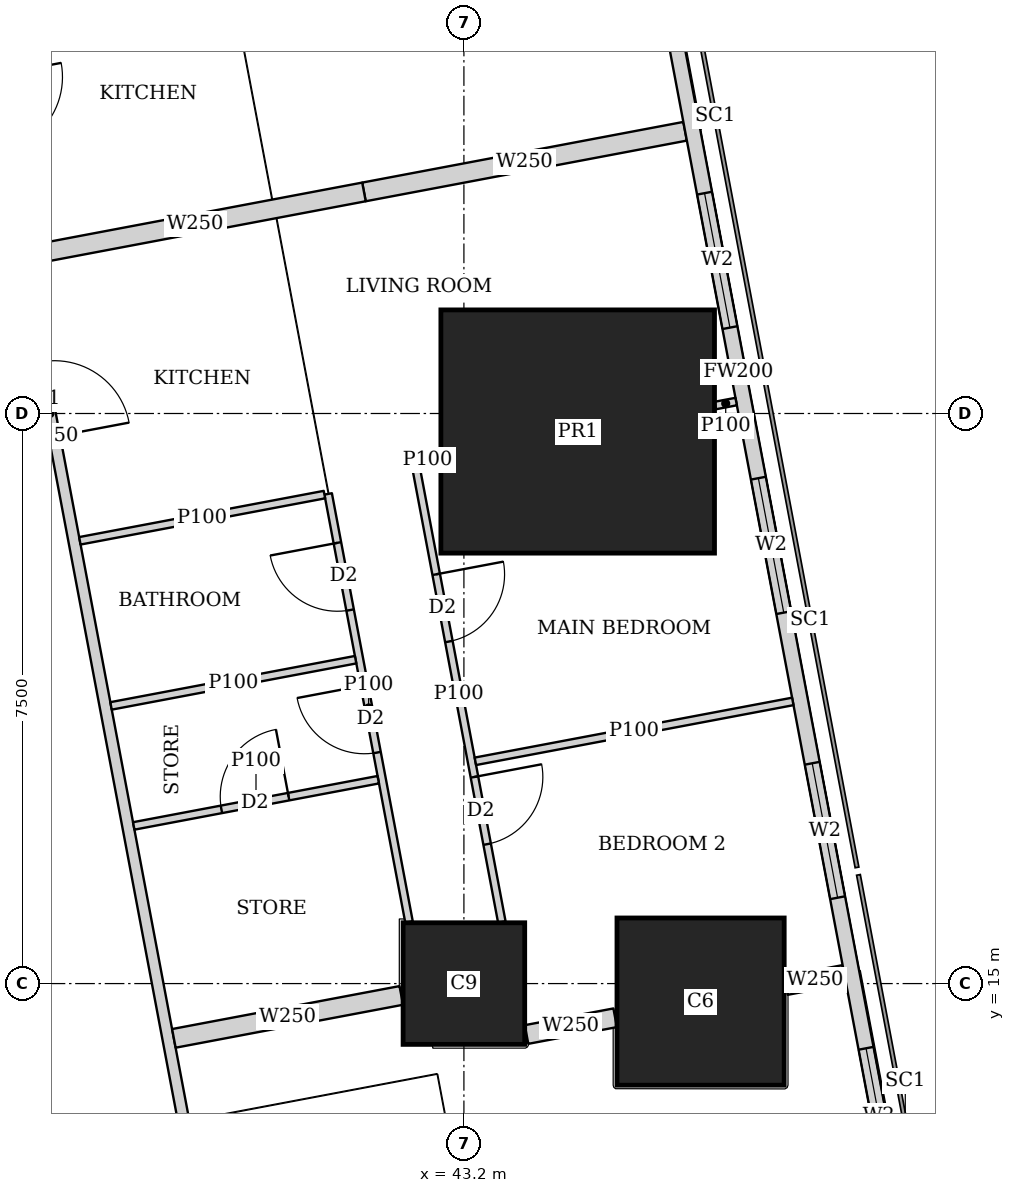
"""IFC4 building model, lengths in metres.
Left out: names, types, materials, properties, quantities, classifications, styles, units other than length and angle.
Written with IfcOpenShell. Run it as: python <this file> out.ifc"""

import sys

from ifc_helpers import new_model, si_unit, direction, frame, frame_2d, origin, origin_2d, place, context, subcontext, project, spatial, rectangle, extrude, element, fill, save


model = new_model("IFC4")
c1 = context("Model", 3, precision=1e-05, world=origin(), true_north=direction((0.0, 1.0)))
c2 = subcontext(c1, "Body", "Model", "MODEL_VIEW")
j1 = project(units=[si_unit("LENGTHUNIT", "METRE"), si_unit("PLANEANGLEUNIT", "RADIAN")], contexts=[c1])
p1 = place(None, origin())
s1 = spatial("IfcSite", under=j1, at=p1, CompositionType="ELEMENT")
p2 = place(p1, origin())
s2 = spatial("IfcBuilding", under=s1, at=p2, CompositionType="ELEMENT")
p3 = place(p2, frame((0.0, 0.0, 77.9)))
s3 = spatial("IfcBuildingStorey", under=s2, at=p3, CompositionType="ELEMENT", Elevation=77.9)
p4 = place(p3, frame((43.2, 15.0, 0.0), z_axis=(0.0, 0.0, 1.0), x_axis=(1.0, 0.0, 0.0)))
e1 = element("IfcColumn", 1, at=p4, inside=s3, PredefinedType="COLUMN", context=c2, shape_type="SweptSolid", body=[
    extrude(rectangle(XDim=1.6, YDim=1.6, at=origin_2d()), origin(), (0.0, 0.0, 1.0), 3.75),
])
p5 = place(p3, frame((46.314, 14.763, 0.0), z_axis=(0.0, 0.0, 1.0), x_axis=(1.0, 0.0, 0.0)))
e2 = element("IfcColumn", 2, at=p5, inside=s3, PredefinedType="COLUMN", context=c2, shape_type="SweptSolid", body=[
    extrude(rectangle(XDim=2.2, YDim=2.2, at=origin_2d()), origin(), (0.0, 0.0, 1.0), 3.75),
])
p6 = place(p3, frame((44.697, 22.263, 0.0), z_axis=(0.0, 0.0, 1.0), x_axis=(1.0, 0.0, 0.0)))
e3 = element("IfcColumn", 3, at=p6, inside=s3, PredefinedType="COLUMN", context=c2, shape_type="SweptSolid", body=[
    extrude(rectangle(XDim=3.6, YDim=3.2, at=origin_2d()), origin(), (0.0, 0.0, 1.0), 3.75),
])
p7 = place(p3, frame((50.653, 2.703, 0.0), z_axis=(0.0, 0.0, 1.0), x_axis=(-0.185612026696, 0.982623109613, 0.0)))
e4 = element("IfcWall", 4, at=p7, inside=s3, PredefinedType="SOLIDWALL", context=c2, shape_type="SweptSolid", body=[
    extrude(rectangle(XDim=41.393, YDim=0.2, at=frame_2d((20.697, 0.0))), origin(), (0.0, 0.0, 1.0), 3.5),
])
p8 = place(p7, frame((1.633, 0.0, 0.9)))
e5 = element("IfcOpeningElement", 5, at=p8, cuts=e4, PredefinedType="OPENING", context=c2, shape_type="SweptSolid", body=[
    extrude(rectangle(XDim=1.8, YDim=1.5, at=frame_2d((0.9, 0.75))), frame((0.0, 0.11, 0.0), z_axis=(0.0, -1.0, 0.0), x_axis=(1.0, 0.0, 0.0)), (0.0, 0.0, 1.0), 0.22),
])
p9 = place(p7, frame((6.032, 0.0, 0.9)))
e6 = element("IfcOpeningElement", 6, at=p9, cuts=e4, PredefinedType="OPENING", context=c2, shape_type="SweptSolid", body=[
    extrude(rectangle(XDim=1.8, YDim=1.5, at=frame_2d((0.9, 0.75))), frame((0.0, 0.11, 0.0), z_axis=(0.0, -1.0, 0.0), x_axis=(1.0, 0.0, 0.0)), (0.0, 0.0, 1.0), 0.22),
])
p10 = place(p7, frame((9.848, 0.0, 0.9)))
e7 = element("IfcOpeningElement", 7, at=p10, cuts=e4, PredefinedType="OPENING", context=c2, shape_type="SweptSolid", body=[
    extrude(rectangle(XDim=1.8, YDim=1.5, at=frame_2d((0.9, 0.75))), frame((0.0, 0.11, 0.0), z_axis=(0.0, -1.0, 0.0), x_axis=(1.0, 0.0, 0.0)), (0.0, 0.0, 1.0), 0.22),
])
p11 = place(p7, frame((13.664, 0.0, 0.9)))
e8 = element("IfcOpeningElement", 8, at=p11, cuts=e4, PredefinedType="OPENING", context=c2, shape_type="SweptSolid", body=[
    extrude(rectangle(XDim=1.8, YDim=1.5, at=frame_2d((0.9, 0.75))), frame((0.0, 0.11, 0.0), z_axis=(0.0, -1.0, 0.0), x_axis=(1.0, 0.0, 0.0)), (0.0, 0.0, 1.0), 0.22),
])
p12 = place(p7, frame((17.481, 0.0, 0.9)))
e9 = element("IfcOpeningElement", 9, at=p12, cuts=e4, PredefinedType="OPENING", context=c2, shape_type="SweptSolid", body=[
    extrude(rectangle(XDim=1.8, YDim=1.5, at=frame_2d((0.9, 0.75))), frame((0.0, 0.11, 0.0), z_axis=(0.0, -1.0, 0.0), x_axis=(1.0, 0.0, 0.0)), (0.0, 0.0, 1.0), 0.22),
])
p13 = place(p7, frame((21.297, 0.0, 0.9)))
e10 = element("IfcOpeningElement", 10, at=p13, cuts=e4, PredefinedType="OPENING", context=c2, shape_type="SweptSolid", body=[
    extrude(rectangle(XDim=1.8, YDim=1.5, at=frame_2d((0.9, 0.75))), frame((0.0, 0.11, 0.0), z_axis=(0.0, -1.0, 0.0), x_axis=(1.0, 0.0, 0.0)), (0.0, 0.0, 1.0), 0.22),
])
p14 = place(p7, frame((25.113, 0.0, 0.9)))
e11 = element("IfcOpeningElement", 11, at=p14, cuts=e4, PredefinedType="OPENING", context=c2, shape_type="SweptSolid", body=[
    extrude(rectangle(XDim=1.8, YDim=1.5, at=frame_2d((0.9, 0.75))), frame((0.0, 0.11, 0.0), z_axis=(0.0, -1.0, 0.0), x_axis=(1.0, 0.0, 0.0)), (0.0, 0.0, 1.0), 0.22),
])
p15 = place(p7, frame((28.93, 0.0, 0.9)))
e12 = element("IfcOpeningElement", 12, at=p15, cuts=e4, PredefinedType="OPENING", context=c2, shape_type="SweptSolid", body=[
    extrude(rectangle(XDim=1.8, YDim=1.5, at=frame_2d((0.9, 0.75))), frame((0.0, 0.11, 0.0), z_axis=(0.0, -1.0, 0.0), x_axis=(1.0, 0.0, 0.0)), (0.0, 0.0, 1.0), 0.22),
])
p16 = place(p7, frame((32.746, 0.0, 0.9)))
e13 = element("IfcOpeningElement", 13, at=p16, cuts=e4, PredefinedType="OPENING", context=c2, shape_type="SweptSolid", body=[
    extrude(rectangle(XDim=1.8, YDim=1.5, at=frame_2d((0.9, 0.75))), frame((0.0, 0.11, 0.0), z_axis=(0.0, -1.0, 0.0), x_axis=(1.0, 0.0, 0.0)), (0.0, 0.0, 1.0), 0.22),
])
p17 = place(p7, frame((36.481, 0.0, 0.9)))
e14 = element("IfcOpeningElement", 14, at=p17, cuts=e4, PredefinedType="OPENING", context=c2, shape_type="SweptSolid", body=[
    extrude(rectangle(XDim=1.8, YDim=1.5, at=frame_2d((0.9, 0.75))), frame((0.0, 0.11, 0.0), z_axis=(0.0, -1.0, 0.0), x_axis=(1.0, 0.0, 0.0)), (0.0, 0.0, 1.0), 0.22),
])
p18 = place(p3, frame((33.382, 45.65, 0.0), z_axis=(0.0, 0.0, 1.0), x_axis=(0.185593544777, -0.982626600565, 0.0)))
e15 = element("IfcWall", 15, at=p18, inside=s3, PredefinedType="SOLIDWALL", context=c2, shape_type="SweptSolid", body=[
    extrude(rectangle(XDim=47.118, YDim=0.15, at=frame_2d((23.559, 0.0))), origin(), (0.0, 0.0, 1.0), 2.2),
])
p19 = place(p18, frame((19.054, 0.0, 0.0)))
e16 = element("IfcOpeningElement", 16, at=p19, cuts=e15, PredefinedType="OPENING", context=c2, shape_type="SweptSolid", body=[
    extrude(rectangle(XDim=1.0, YDim=2.1, at=frame_2d((0.5, 1.05))), frame((0.0, 0.085, 0.0), z_axis=(0.0, -1.0, 0.0), x_axis=(1.0, 0.0, 0.0)), (0.0, 0.0, 1.0), 0.17),
])
p20 = place(p18, frame((22.87, 0.0, 0.0)))
e17 = element("IfcOpeningElement", 17, at=p20, cuts=e15, PredefinedType="OPENING", context=c2, shape_type="SweptSolid", body=[
    extrude(rectangle(XDim=1.0, YDim=2.1, at=frame_2d((0.5, 1.05))), frame((0.0, 0.085, 0.0), z_axis=(0.0, -1.0, 0.0), x_axis=(1.0, 0.0, 0.0)), (0.0, 0.0, 1.0), 0.17),
])
p21 = place(p18, frame((33.833, 0.0, 0.0)))
e18 = element("IfcOpeningElement", 18, at=p21, cuts=e15, PredefinedType="OPENING", context=c2, shape_type="SweptSolid", body=[
    extrude(rectangle(XDim=1.0, YDim=2.1, at=frame_2d((0.5, 1.05))), frame((0.0, 0.085, 0.0), z_axis=(0.0, -1.0, 0.0), x_axis=(1.0, 0.0, 0.0)), (0.0, 0.0, 1.0), 0.17),
])
p22 = place(p3, frame((42.566, 21.809, 0.0), z_axis=(0.0, 0.0, 1.0), x_axis=(0.18559218796, -0.982626856832, 0.0)))
e19 = element("IfcWall", 19, at=p22, inside=s3, PredefinedType="PARTITIONING", context=c2, shape_type="SweptSolid", body=[
    extrude(rectangle(XDim=6.105, YDim=0.1, at=frame_2d((3.052, 0.0))), origin(), (0.0, 0.0, 1.0), 2.5),
])
p23 = place(p22, frame((1.45, 0.0, 0.0)))
e20 = element("IfcOpeningElement", 20, at=p23, cuts=e19, PredefinedType="OPENING", context=c2, shape_type="SweptSolid", body=[
    extrude(rectangle(XDim=0.9, YDim=2.1, at=frame_2d((0.45, 1.05))), frame((0.0, 0.06, 0.0), z_axis=(0.0, -1.0, 0.0), x_axis=(1.0, 0.0, 0.0)), (0.0, 0.0, 1.0), 0.12),
])
p24 = place(p22, frame((4.163, 0.0, 0.0)))
e21 = element("IfcOpeningElement", 21, at=p24, cuts=e19, PredefinedType="OPENING", context=c2, shape_type="SweptSolid", body=[
    extrude(rectangle(XDim=0.9, YDim=2.1, at=frame_2d((0.45, 1.05))), frame((0.0, 0.06, 0.0), z_axis=(0.0, -1.0, 0.0), x_axis=(1.0, 0.0, 0.0)), (0.0, 0.0, 1.0), 0.12),
])
p25 = place(p3, frame((41.414, 21.442, 0.0), z_axis=(0.0, 0.0, 1.0), x_axis=(0.185636022079, -0.982618576716, 0.0)))
e22 = element("IfcWall", 22, at=p25, inside=s3, PredefinedType="PARTITIONING", context=c2, shape_type="SweptSolid", body=[
    extrude(rectangle(XDim=5.731, YDim=0.1, at=frame_2d((2.866, 0.0))), origin(), (0.0, 0.0, 1.0), 3.5),
])
p26 = place(p25, frame((0.655, 0.0, 0.0)))
e23 = element("IfcOpeningElement", 23, at=p26, cuts=e22, PredefinedType="OPENING", context=c2, shape_type="SweptSolid", body=[
    extrude(rectangle(XDim=0.9, YDim=2.1, at=frame_2d((0.45, 1.05))), frame((0.0, 0.06, 0.0), z_axis=(0.0, -1.0, 0.0), x_axis=(1.0, 0.0, 0.0)), (0.0, 0.0, 1.0), 0.12),
])
p27 = place(p25, frame((2.563, 0.0, 0.0)))
e24 = element("IfcOpeningElement", 24, at=p27, cuts=e22, PredefinedType="OPENING", context=c2, shape_type="SweptSolid", body=[
    extrude(rectangle(XDim=0.9, YDim=2.1, at=frame_2d((0.45, 1.05))), frame((0.0, 0.06, 0.0), z_axis=(0.0, -1.0, 0.0), x_axis=(1.0, 0.0, 0.0)), (0.0, 0.0, 1.0), 0.12),
])
p28 = place(p3, frame((46.782, 22.657, 0.0), z_axis=(0.0, 0.0, 1.0), x_axis=(-0.982574553168, -0.185868898601, 0.0)))
e25 = element("IfcWall", 25, at=p28, inside=s3, PredefinedType="PARTITIONING", context=c2, shape_type="SweptSolid", body=[
    extrude(rectangle(XDim=0.28, YDim=0.1, at=frame_2d((0.14, 0.0))), origin(), (0.0, 0.0, 1.0), 3.5),
])
p29 = place(p3, frame((42.887, 21.921, 0.0), z_axis=(0.0, 0.0, 1.0), x_axis=(-0.982274918032, -0.187445953293, 0.0)))
e26 = element("IfcWall", 26, at=p29, inside=s3, PredefinedType="PARTITIONING", context=c2, shape_type="SweptSolid", body=[
    extrude(rectangle(XDim=0.336, YDim=0.1, at=frame_2d((0.168, 0.0))), origin(), (0.0, 0.0, 1.0), 2.5),
])
p30 = place(p3, frame((47.527, 18.712, 0.0), z_axis=(0.0, 0.0, 1.0), x_axis=(-0.982665405803, -0.185387972203, 0.0)))
e27 = element("IfcWall", 27, at=p30, inside=s3, PredefinedType="PARTITIONING", context=c2, shape_type="SweptSolid", body=[
    extrude(rectangle(XDim=4.25, YDim=0.1, at=frame_2d((2.125, 0.0))), origin(), (0.0, 0.0, 1.0), 2.2),
])
p31 = place(p3, frame((41.365, 21.433, 0.0), z_axis=(0.0, 0.0, 1.0), x_axis=(-0.982607026909, -0.185697147715, 0.0)))
e28 = element("IfcWall", 28, at=p31, inside=s3, PredefinedType="PARTITIONING", context=c2, shape_type="SweptSolid", body=[
    extrude(rectangle(XDim=3.275, YDim=0.1, at=frame_2d((1.637, 0.0))), origin(), (0.0, 0.0, 1.0), 3.5),
])
p32 = place(p3, frame((42.073, 17.682, 0.0), z_axis=(0.0, 0.0, 1.0), x_axis=(-0.982610347627, -0.185679575441, 0.0)))
e29 = element("IfcWall", 29, at=p32, inside=s3, PredefinedType="PARTITIONING", context=c2, shape_type="SweptSolid", body=[
    extrude(rectangle(XDim=3.274, YDim=0.1, at=frame_2d((1.637, 0.0))), origin(), (0.0, 0.0, 1.0), 3.5),
])
p33 = place(p32, frame((1.2, 0.0, 0.0)))
e30 = element("IfcOpeningElement", 30, at=p33, cuts=e29, PredefinedType="OPENING", context=c2, shape_type="SweptSolid", body=[
    extrude(rectangle(XDim=0.9, YDim=2.1, at=frame_2d((0.45, 1.05))), frame((0.0, 0.06, 0.0), z_axis=(0.0, -1.0, 0.0), x_axis=(1.0, 0.0, 0.0)), (0.0, 0.0, 1.0), 0.12),
])
p34 = place(p3, frame((41.775, 19.261, 0.0), z_axis=(0.0, 0.0, 1.0), x_axis=(-0.982620626894, -0.185625169636, 0.0)))
e31 = element("IfcWall", 31, at=p34, inside=s3, PredefinedType="PARTITIONING", context=c2, shape_type="SweptSolid", body=[
    extrude(rectangle(XDim=3.275, YDim=0.1, at=frame_2d((1.637, 0.0))), origin(), (0.0, 0.0, 1.0), 3.5),
])
p35 = place(p3, frame((46.11, 26.213, 0.0), z_axis=(0.0, 0.0, 1.0), x_axis=(-0.982633535512, -0.185556823879, 0.0)))
e32 = element("IfcWall", 32, at=p35, inside=s3, PredefinedType="SOLIDWALL", context=c2, shape_type="SweptSolid", body=[
    extrude(rectangle(XDim=4.3, YDim=0.25, at=frame_2d((2.15, 0.0))), origin(), (0.0, 0.0, 1.0), 2.2),
])
p36 = place(p3, frame((41.885, 25.415, 0.0), z_axis=(0.0, 0.0, 1.0), x_axis=(-0.982612837616, -0.185666398014, 0.0)))
e33 = element("IfcWall", 33, at=p36, inside=s3, PredefinedType="SOLIDWALL", context=c2, shape_type="SweptSolid", body=[
    extrude(rectangle(XDim=4.525, YDim=0.25, at=frame_2d((2.262, 0.0))), origin(), (0.0, 0.0, 1.0), 3.5),
])
p37 = place(p3, frame((48.206, 15.12, 0.0), z_axis=(0.0, 0.0, 1.0), x_axis=(-0.982638023929, -0.185533053469, 0.0)))
e34 = element("IfcWall", 34, at=p37, inside=s3, PredefinedType="SOLIDWALL", context=c2, shape_type="SweptSolid", body=[
    extrude(rectangle(XDim=0.782, YDim=0.25, at=frame_2d((0.391, 0.0))), origin(), (0.0, 0.0, 1.0), 3.5),
])
p38 = place(p3, frame((45.19, 14.55, 0.0), z_axis=(0.0, 0.0, 1.0), x_axis=(-0.982666604435, -0.185381618634, 0.0)))
e35 = element("IfcWall", 35, at=p38, inside=s3, PredefinedType="SOLIDWALL", context=c2, shape_type="SweptSolid", body=[
    extrude(rectangle(XDim=1.187, YDim=0.25, at=frame_2d((0.593, 0.0))), origin(), (0.0, 0.0, 1.0), 3.5),
])
p39 = place(p3, frame((42.376, 14.844, 0.0), z_axis=(0.0, 0.0, 1.0), x_axis=(-0.982636286056, -0.185542257522, 0.0)))
e36 = element("IfcWall", 36, at=p39, inside=s3, PredefinedType="SOLIDWALL", context=c2, shape_type="SweptSolid", body=[
    extrude(rectangle(XDim=3.045, YDim=0.25, at=frame_2d((1.522, 0.0))), origin(), (0.0, 0.0, 1.0), 3.5),
])
p40 = place(p3, frame((38.202, 10.163, 0.0), z_axis=(0.0, 0.0, 1.0), x_axis=(-0.185645577403, 0.982616771479, 0.0)))
e37 = element("IfcWall", 37, at=p40, inside=s3, PredefinedType="PARTITIONING", context=c2, shape_type="SweptSolid", body=[
    extrude(rectangle(XDim=12.555, YDim=0.125, at=frame_2d((6.278, 0.0))), origin(), (0.0, 0.0, 1.0), 2.5),
])
p41 = place(p40, frame((0.708, 0.0, 0.0)))
e38 = element("IfcOpeningElement", 38, at=p41, cuts=e37, PredefinedType="OPENING", context=c2, shape_type="SweptSolid", body=[
    extrude(rectangle(XDim=1.0, YDim=2.1, at=frame_2d((0.5, 1.05))), frame((0.0, 0.073, 0.0), z_axis=(0.0, -1.0, 0.0), x_axis=(1.0, 0.0, 0.0)), (0.0, 0.0, 1.0), 0.145),
])
p42 = place(p40, frame((6.0, 0.0, 0.0)))
e39 = element("IfcOpeningElement", 39, at=p42, cuts=e37, PredefinedType="OPENING", context=c2, shape_type="SweptSolid", body=[
    extrude(rectangle(XDim=1.0, YDim=2.1, at=frame_2d((0.5, 1.05))), frame((0.0, 0.073, 0.0), z_axis=(0.0, -1.0, 0.0), x_axis=(1.0, 0.0, 0.0)), (0.0, 0.0, 1.0), 0.145),
])
p43 = place(p40, frame((9.562, 0.0, 0.0)))
e40 = element("IfcOpeningElement", 40, at=p43, cuts=e37, PredefinedType="OPENING", context=c2, shape_type="SweptSolid", body=[
    extrude(rectangle(XDim=1.0, YDim=2.1, at=frame_2d((0.5, 1.05))), frame((0.0, 0.073, 0.0), z_axis=(0.0, -1.0, 0.0), x_axis=(1.0, 0.0, 0.0)), (0.0, 0.0, 1.0), 0.145),
])
p44 = place(p10, origin())
e41 = element("IfcWindow", 41, at=p44, inside=s3, PartitioningType="SINGLE_PANEL", PredefinedType="WINDOW", context=c2, shape_type="SweptSolid", body=[
    extrude(rectangle(XDim=1.8, YDim=1.5, at=frame_2d((0.9, 0.75))), frame((0.0, 0.03, 0.0), z_axis=(0.0, -1.0, 0.0), x_axis=(1.0, 0.0, 0.0)), (0.0, 0.0, 1.0), 0.06),
])
fill(e7, e41)
p45 = place(p11, origin())
e42 = element("IfcWindow", 42, at=p45, inside=s3, PartitioningType="SINGLE_PANEL", PredefinedType="WINDOW", context=c2, shape_type="SweptSolid", body=[
    extrude(rectangle(XDim=1.8, YDim=1.5, at=frame_2d((0.9, 0.75))), frame((0.0, 0.03, 0.0), z_axis=(0.0, -1.0, 0.0), x_axis=(1.0, 0.0, 0.0)), (0.0, 0.0, 1.0), 0.06),
])
fill(e8, e42)
p46 = place(p12, origin())
e43 = element("IfcWindow", 43, at=p46, inside=s3, PartitioningType="SINGLE_PANEL", PredefinedType="WINDOW", context=c2, shape_type="SweptSolid", body=[
    extrude(rectangle(XDim=1.8, YDim=1.5, at=frame_2d((0.9, 0.75))), frame((0.0, 0.03, 0.0), z_axis=(0.0, -1.0, 0.0), x_axis=(1.0, 0.0, 0.0)), (0.0, 0.0, 1.0), 0.06),
])
fill(e9, e43)
p47 = place(p13, origin())
e44 = element("IfcWindow", 44, at=p47, inside=s3, PartitioningType="SINGLE_PANEL", PredefinedType="WINDOW", context=c2, shape_type="SweptSolid", body=[
    extrude(rectangle(XDim=1.8, YDim=1.5, at=frame_2d((0.9, 0.75))), frame((0.0, 0.03, 0.0), z_axis=(0.0, -1.0, 0.0), x_axis=(1.0, 0.0, 0.0)), (0.0, 0.0, 1.0), 0.06),
])
fill(e10, e44)
p48 = place(p23, origin())
e45 = element("IfcDoor", 45, at=p48, inside=s3, OperationType="SINGLE_SWING_LEFT", PredefinedType="DOOR", context=c2, shape_type="SweptSolid", body=[
    extrude(rectangle(XDim=0.9, YDim=2.1, at=frame_2d((0.45, 1.05))), frame((0.0, 0.025, 0.0), z_axis=(0.0, -1.0, 0.0), x_axis=(1.0, 0.0, 0.0)), (0.0, 0.0, 1.0), 0.05),
])
fill(e20, e45)
p49 = place(p24, origin())
e46 = element("IfcDoor", 46, at=p49, inside=s3, OperationType="SINGLE_SWING_LEFT", PredefinedType="DOOR", context=c2, shape_type="SweptSolid", body=[
    extrude(rectangle(XDim=0.9, YDim=2.1, at=frame_2d((0.45, 1.05))), frame((0.0, 0.025, 0.0), z_axis=(0.0, -1.0, 0.0), x_axis=(1.0, 0.0, 0.0)), (0.0, 0.0, 1.0), 0.05),
])
fill(e21, e46)
p50 = place(p26, origin())
e47 = element("IfcDoor", 47, at=p50, inside=s3, OperationType="SINGLE_SWING_RIGHT", PredefinedType="DOOR", context=c2, shape_type="SweptSolid", body=[
    extrude(rectangle(XDim=0.9, YDim=2.1, at=frame_2d((0.45, 1.05))), frame((0.0, 0.025, 0.0), z_axis=(0.0, -1.0, 0.0), x_axis=(1.0, 0.0, 0.0)), (0.0, 0.0, 1.0), 0.05),
])
fill(e23, e47)
p51 = place(p27, origin())
e48 = element("IfcDoor", 48, at=p51, inside=s3, OperationType="SINGLE_SWING_RIGHT", PredefinedType="DOOR", context=c2, shape_type="SweptSolid", body=[
    extrude(rectangle(XDim=0.9, YDim=2.1, at=frame_2d((0.45, 1.05))), frame((0.0, 0.025, 0.0), z_axis=(0.0, -1.0, 0.0), x_axis=(1.0, 0.0, 0.0)), (0.0, 0.0, 1.0), 0.05),
])
fill(e24, e48)
p52 = place(p20, origin())
e49 = element("IfcDoor", 49, at=p52, inside=s3, OperationType="SINGLE_SWING_RIGHT", PredefinedType="DOOR", context=c2, shape_type="SweptSolid", body=[
    extrude(rectangle(XDim=1.0, YDim=2.1, at=frame_2d((0.5, 1.05))), frame((0.0, 0.025, 0.0), z_axis=(0.0, -1.0, 0.0), x_axis=(1.0, 0.0, 0.0)), (0.0, 0.0, 1.0), 0.05),
])
fill(e17, e49)
p53 = place(p33, origin())
e50 = element("IfcDoor", 50, at=p53, inside=s3, OperationType="SINGLE_SWING_RIGHT", PredefinedType="DOOR", context=c2, shape_type="SweptSolid", body=[
    extrude(rectangle(XDim=0.9, YDim=2.1, at=frame_2d((0.45, 1.05))), frame((0.0, 0.025, 0.0), z_axis=(0.0, -1.0, 0.0), x_axis=(1.0, 0.0, 0.0)), (0.0, 0.0, 1.0), 0.05),
])
fill(e30, e50)
save(model, sys.argv[1])
